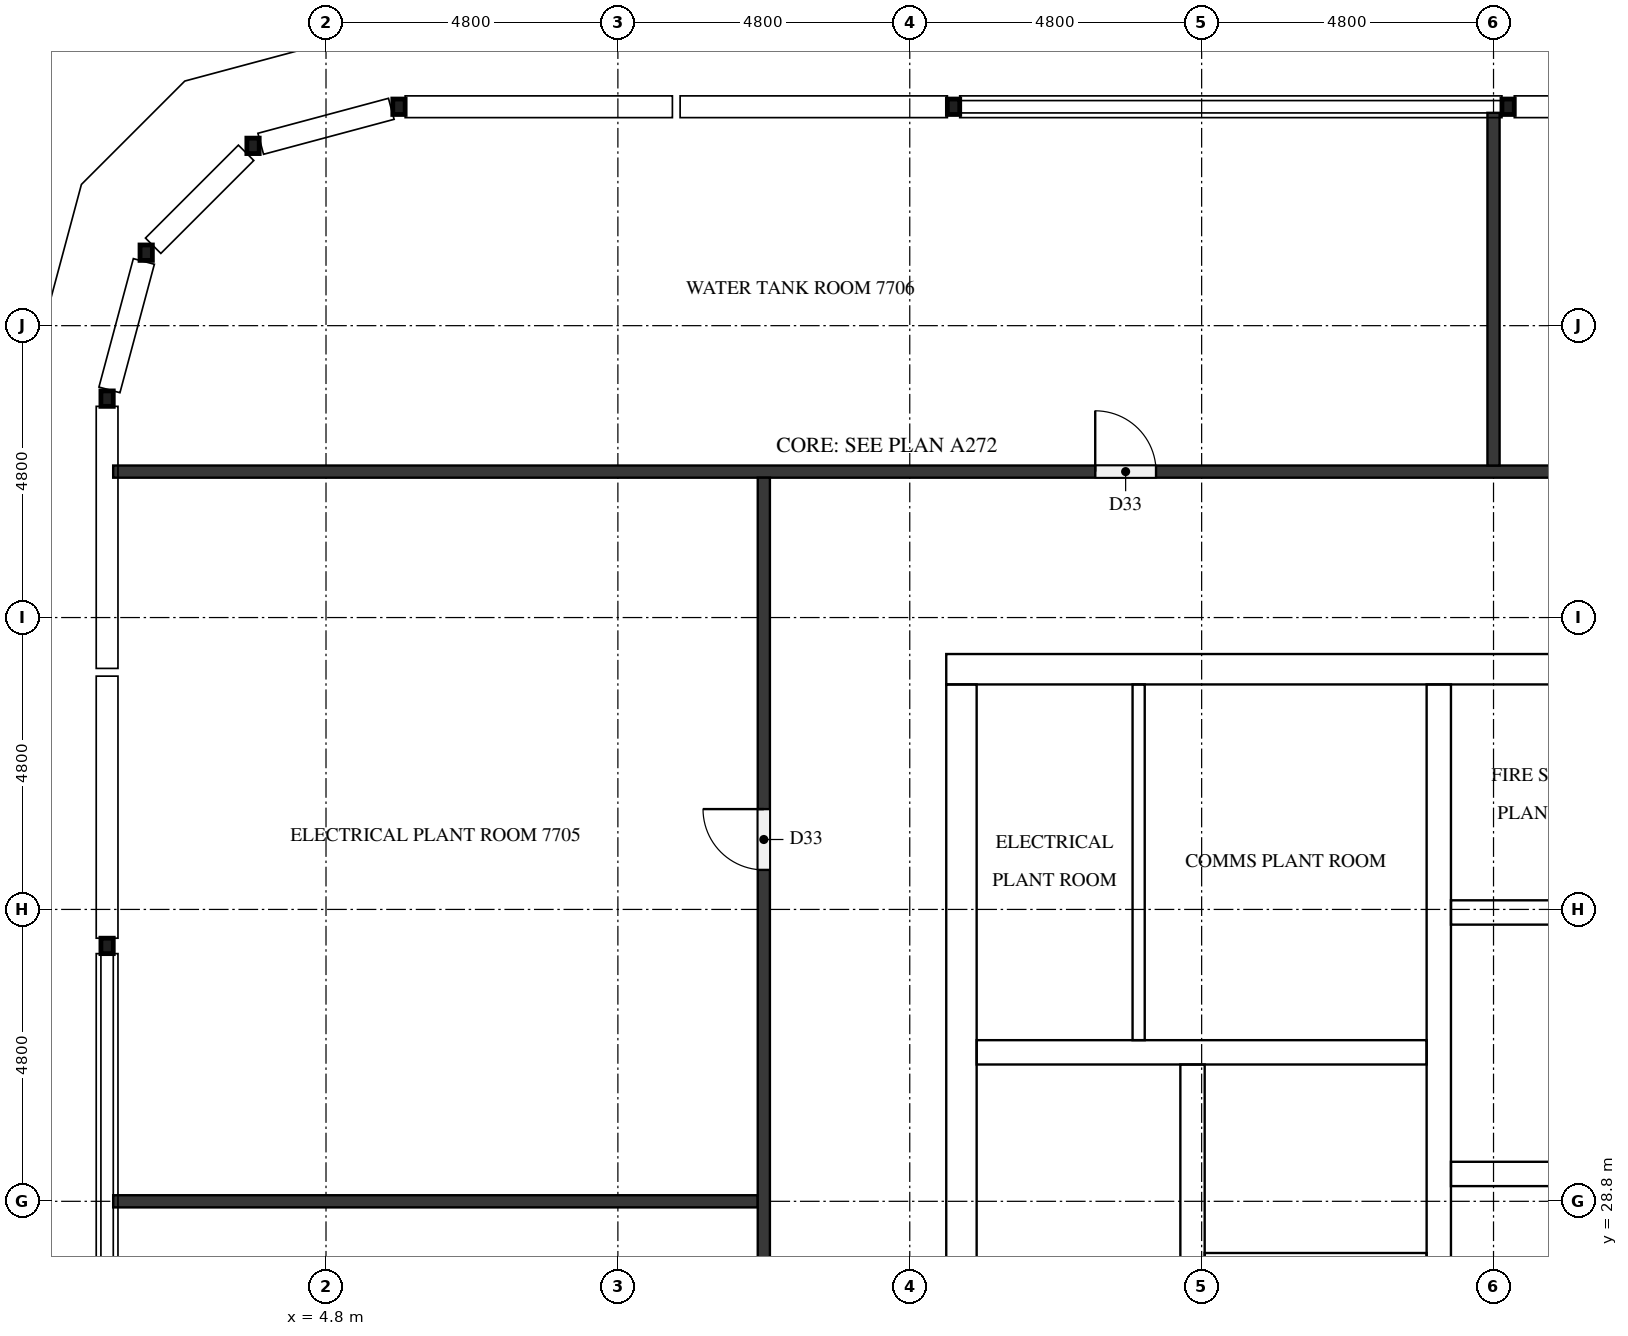
"""IFC4 building model, lengths in metres.
Left out: names, types, materials, properties, quantities, classifications, styles, units other than length and angle.
Written with IfcOpenShell. Run it as: python <this file> out.ifc"""

import sys

from ifc_helpers import new_model, si_unit, direction, frame, frame_2d, origin, origin_2d, place, context, subcontext, project, spatial, rectangle, hollow_rectangle, extrude, element, fill, save


model = new_model("IFC4")
c1 = context("Model", 3, precision=1e-05, world=origin(), true_north=direction((0.0, 1.0)))
c2 = subcontext(c1, "Body", "Model", "MODEL_VIEW")
j1 = project(units=[si_unit("LENGTHUNIT", "METRE"), si_unit("PLANEANGLEUNIT", "RADIAN")], contexts=[c1])
p1 = place(None, origin())
s1 = spatial("IfcSite", under=j1, at=p1, CompositionType="ELEMENT")
p2 = place(p1, origin())
s2 = spatial("IfcBuilding", under=s1, at=p2, CompositionType="ELEMENT")
p3 = place(p2, frame((0.0, 0.0, 296.3)))
s3 = spatial("IfcBuildingStorey", under=s2, at=p3, CompositionType="ELEMENT", Elevation=296.3)
p4 = place(p3, frame((15.0, 37.55, 0.0), z_axis=(0.0, 0.0, 1.0), x_axis=(1.0, 0.0, 0.0)))
e1 = element("IfcWall", 1, at=p4, inside=s3, PredefinedType="SHEAR", context=c2, shape_type="SweptSolid", body=[
    extrude(rectangle(XDim=32.4, YDim=0.5, at=frame_2d((16.2, 0.0))), origin(), (0.0, 0.0, 1.0), 4.4),
])
p5 = place(p4, frame((15.3, 0.0, 0.0)))
e2 = element("IfcOpeningElement", 2, at=p5, cuts=e1, PredefinedType="OPENING", context=c2, shape_type="SweptSolid", body=[
    extrude(rectangle(XDim=1.8, YDim=2.1, at=frame_2d((0.9, 1.05))), frame((0.0, 0.26, 0.0), z_axis=(0.0, -1.0, 0.0), x_axis=(1.0, 0.0, 0.0)), (0.0, 0.0, 1.0), 0.52),
])
p6 = place(p4, frame((1.282, 0.0, 0.0)))
e3 = element("IfcOpeningElement", 3, at=p6, cuts=e1, PredefinedType="OPENING", context=c2, shape_type="SweptSolid", body=[
    extrude(rectangle(XDim=1.0, YDim=2.1, at=frame_2d((0.5, 1.05))), frame((0.0, 0.26, 0.0), z_axis=(0.0, -1.0, 0.0), x_axis=(1.0, 0.0, 0.0)), (0.0, 0.0, 1.0), 0.52),
])
p7 = place(p4, frame((5.082, 0.0, 0.0)))
e4 = element("IfcOpeningElement", 4, at=p7, cuts=e1, PredefinedType="OPENING", context=c2, shape_type="SweptSolid", body=[
    extrude(rectangle(XDim=1.0, YDim=2.1, at=frame_2d((0.5, 1.05))), frame((0.0, 0.26, 0.0), z_axis=(0.0, -1.0, 0.0), x_axis=(1.0, 0.0, 0.0)), (0.0, 0.0, 1.0), 0.52),
])
p8 = place(p3, frame((15.25, 15.5, 0.0), z_axis=(0.0, 0.0, 1.0), x_axis=(0.0, 1.0, 0.0)))
e5 = element("IfcWall", 5, at=p8, inside=s3, PredefinedType="SHEAR", context=c2, shape_type="SweptSolid", body=[
    extrude(rectangle(XDim=21.8, YDim=0.5, at=frame_2d((10.9, 0.0))), origin(), (0.0, 0.0, 1.0), 4.4),
])
p9 = place(p8, frame((5.26, 0.0, 0.0)))
e6 = element("IfcOpeningElement", 6, at=p9, cuts=e5, PredefinedType="OPENING", context=c2, shape_type="SweptSolid", body=[
    extrude(rectangle(XDim=1.2, YDim=2.1, at=frame_2d((0.6, 1.05))), frame((0.0, 0.26, 0.0), z_axis=(0.0, -1.0, 0.0), x_axis=(1.0, 0.0, 0.0)), (0.0, 0.0, 1.0), 0.52),
])
p10 = place(p3, frame((19.05, 15.5, 0.0), z_axis=(0.0, 0.0, 1.0), x_axis=(0.0, 1.0, 0.0)))
e7 = element("IfcWall", 7, at=p10, inside=s3, PredefinedType="SHEAR", context=c2, shape_type="SweptSolid", body=[
    extrude(rectangle(XDim=15.55, YDim=0.4, at=frame_2d((7.775, 0.0))), origin(), (0.0, 0.0, 1.0), 4.4),
])
p11 = place(p10, frame((9.95, 0.0, 0.0)))
e8 = element("IfcOpeningElement", 8, at=p11, cuts=e7, PredefinedType="OPENING", context=c2, shape_type="SweptSolid", body=[
    extrude(rectangle(XDim=1.1, YDim=2.1, at=frame_2d((0.55, 1.05))), frame((0.0, 0.21, 0.0), z_axis=(0.0, -1.0, 0.0), x_axis=(1.0, 0.0, 0.0)), (0.0, 0.0, 1.0), 0.42),
])
p12 = place(p10, frame((13.45, 0.0, 0.0)))
e9 = element("IfcOpeningElement", 9, at=p12, cuts=e7, PredefinedType="OPENING", context=c2, shape_type="SweptSolid", body=[
    extrude(rectangle(XDim=1.1, YDim=2.1, at=frame_2d((0.55, 1.05))), frame((0.0, 0.21, 0.0), z_axis=(0.0, -1.0, 0.0), x_axis=(1.0, 0.0, 0.0)), (0.0, 0.0, 1.0), 0.42),
])
p13 = place(p10, frame((0.7, 0.0, 0.0)))
e10 = element("IfcOpeningElement", 10, at=p13, cuts=e7, PredefinedType="OPENING", context=c2, shape_type="SweptSolid", body=[
    extrude(rectangle(XDim=1.2, YDim=2.1, at=frame_2d((0.6, 1.05))), frame((0.0, 0.21, 0.0), z_axis=(0.0, -1.0, 0.0), x_axis=(1.0, 0.0, 0.0)), (0.0, 0.0, 1.0), 0.42),
])
p14 = place(p3, frame((23.1, 15.5, 0.0), z_axis=(0.0, 0.0, 1.0), x_axis=(0.0, 1.0, 0.0)))
e11 = element("IfcWall", 11, at=p14, inside=s3, PredefinedType="SHEAR", context=c2, shape_type="SweptSolid", body=[
    extrude(rectangle(XDim=21.8, YDim=0.4, at=frame_2d((10.9, 0.0))), origin(), (0.0, 0.0, 1.0), 4.4),
])
p15 = place(p3, frame((19.25, 27.75, 0.0), z_axis=(0.0, 0.0, 1.0), x_axis=(1.0, 0.0, 0.0)))
e12 = element("IfcWall", 12, at=p15, inside=s3, PredefinedType="SHEAR", context=c2, shape_type="SweptSolid", body=[
    extrude(rectangle(XDim=3.65, YDim=0.4, at=frame_2d((1.825, 0.0))), origin(), (0.0, 0.0, 1.0), 4.4),
])
p16 = place(p3, frame((15.5, 31.25, 0.0), z_axis=(0.0, 0.0, 1.0), x_axis=(1.0, 0.0, 0.0)))
e13 = element("IfcWall", 13, at=p16, inside=s3, PredefinedType="SHEAR", context=c2, shape_type="SweptSolid", body=[
    extrude(rectangle(XDim=7.4, YDim=0.4, at=frame_2d((3.7, 0.0))), origin(), (0.0, 0.0, 1.0), 4.4),
])
p17 = place(p3, frame((23.3, 29.25, 0.0), z_axis=(0.0, 0.0, 1.0), x_axis=(1.0, 0.0, 0.0)))
e14 = element("IfcWall", 14, at=p17, inside=s3, PredefinedType="SHEAR", context=c2, shape_type="SweptSolid", body=[
    extrude(rectangle(XDim=15.8, YDim=0.4, at=frame_2d((7.9, 0.0))), origin(), (0.0, 0.0, 1.0), 4.4),
])
p18 = place(p3, frame((23.3, 33.55, 0.0), z_axis=(0.0, 0.0, 1.0), x_axis=(1.0, 0.0, 0.0)))
e15 = element("IfcWall", 15, at=p18, inside=s3, PredefinedType="SHEAR", context=c2, shape_type="SweptSolid", body=[
    extrude(rectangle(XDim=5.6, YDim=0.4, at=frame_2d((2.8, 0.0))), origin(), (0.0, 0.0, 1.0), 4.4),
])
p19 = place(p18, frame((1.296, 0.0, 0.0)))
e16 = element("IfcOpeningElement", 16, at=p19, cuts=e15, PredefinedType="OPENING", context=c2, shape_type="SweptSolid", body=[
    extrude(rectangle(XDim=1.0, YDim=2.1, at=frame_2d((0.5, 1.05))), frame((0.0, 0.21, 0.0), z_axis=(0.0, -1.0, 0.0), x_axis=(1.0, 0.0, 0.0)), (0.0, 0.0, 1.0), 0.42),
])
p20 = place(p18, frame((3.996, 0.0, 0.0)))
e17 = element("IfcOpeningElement", 17, at=p20, cuts=e15, PredefinedType="OPENING", context=c2, shape_type="SweptSolid", body=[
    extrude(rectangle(XDim=1.0, YDim=2.1, at=frame_2d((0.5, 1.05))), frame((0.0, 0.21, 0.0), z_axis=(0.0, -1.0, 0.0), x_axis=(1.0, 0.0, 0.0)), (0.0, 0.0, 1.0), 0.42),
])
for number, where, z_axis, x_axis in (
    (18, (24.24, 46.8, 0.0), (0.0, 0.0, 1.0), (1.0, 0.0, 0.0)),
    (19, (15.12, 46.8, 0.0), (0.0, 0.0, 1.0), (1.0, 0.0, 0.0)),
    (20, (6.0, 46.8, 0.0), (0.0, 0.0, 1.0), (1.0, 0.0, 0.0)),
    (21, (3.6, 46.157, 0.0), (0.0, 0.0, 1.0), (1.0, 0.0, 0.0)),
    (22, (1.843, 44.4, 0.0), (0.0, 0.0, 1.0), (1.0, 0.0, 0.0)),
    (23, (1.2, 42.0, 0.0), (0.0, 0.0, 1.0), (1.0, 0.0, 0.0)),
    (24, (1.2, 33.0, 0.0), (0.0, 0.0, 1.0), (1.0, 0.0, 0.0)),
):
    element("IfcColumn", number, at=place(p3, frame(where, z_axis=z_axis, x_axis=x_axis)), inside=s3, PredefinedType="COLUMN", context=c2, shape_type="SweptSolid", body=[
        extrude(hollow_rectangle(XDim=0.203, YDim=0.254, WallThickness=0.01, InnerFilletRadius=0.004, OuterFilletRadius=0.013, at=origin_2d()), origin(), (0.0, 0.0, 1.0), 4.4),
    ])
p21 = place(p3, frame((18.164, 31.45, 0.0), z_axis=(0.0, 0.0, 1.0), x_axis=(0.0, 1.0, 0.0)))
e25 = element("IfcWall", 25, at=p21, inside=s3, PredefinedType="PARTITIONING", context=c2, shape_type="SweptSolid", body=[
    extrude(rectangle(XDim=5.85, YDim=0.2, at=frame_2d((2.925, 0.0))), origin(), (0.0, 0.0, 1.0), 4.4),
])
p22 = place(p3, frame((1.3, 28.8, 0.0), z_axis=(0.0, 0.0, 1.0), x_axis=(1.0, 0.0, 0.0)))
e26 = element("IfcWall", 26, at=p22, inside=s3, PredefinedType="PARTITIONING", context=c2, shape_type="SweptSolid", body=[
    extrude(rectangle(XDim=10.6, YDim=0.2, at=frame_2d((5.3, 0.0))), origin(), (0.0, 0.0, 1.0), 4.4),
])
p23 = place(p3, frame((1.3, 40.8, 0.0), z_axis=(0.0, 0.0, 1.0), x_axis=(1.0, 0.0, 0.0)))
e27 = element("IfcWall", 27, at=p23, inside=s3, PredefinedType="PARTITIONING", context=c2, shape_type="SweptSolid", body=[
    extrude(rectangle(XDim=55.0, YDim=0.2, at=frame_2d((27.5, 0.0))), origin(), (0.0, 0.0, 1.0), 4.4),
])
p24 = place(p23, frame((16.15, 0.0, 0.0)))
e28 = element("IfcOpeningElement", 28, at=p24, cuts=e27, PredefinedType="OPENING", context=c2, shape_type="SweptSolid", body=[
    extrude(rectangle(XDim=1.0, YDim=2.1, at=frame_2d((0.5, 1.05))), frame((0.0, 0.11, 0.0), z_axis=(0.0, -1.0, 0.0), x_axis=(1.0, 0.0, 0.0)), (0.0, 0.0, 1.0), 0.22),
])
p25 = place(p23, frame((35.35, 0.0, 0.0)))
e29 = element("IfcOpeningElement", 29, at=p25, cuts=e27, PredefinedType="OPENING", context=c2, shape_type="SweptSolid", body=[
    extrude(rectangle(XDim=1.0, YDim=2.1, at=frame_2d((0.5, 1.05))), frame((0.0, 0.11, 0.0), z_axis=(0.0, -1.0, 0.0), x_axis=(1.0, 0.0, 0.0)), (0.0, 0.0, 1.0), 0.22),
])
p26 = place(p3, frame((12.0, 12.1, 0.0), z_axis=(0.0, 0.0, 1.0), x_axis=(0.0, 1.0, 0.0)))
e30 = element("IfcWall", 30, at=p26, inside=s3, PredefinedType="PARTITIONING", context=c2, shape_type="SweptSolid", body=[
    extrude(rectangle(XDim=28.6, YDim=0.2, at=frame_2d((14.3, 0.0))), origin(), (0.0, 0.0, 1.0), 4.4),
])
p27 = place(p26, frame((7.85, 0.0, 0.0)))
e31 = element("IfcOpeningElement", 31, at=p27, cuts=e30, PredefinedType="OPENING", context=c2, shape_type="SweptSolid", body=[
    extrude(rectangle(XDim=1.0, YDim=2.1, at=frame_2d((0.5, 1.05))), frame((0.0, 0.11, 0.0), z_axis=(0.0, -1.0, 0.0), x_axis=(1.0, 0.0, 0.0)), (0.0, 0.0, 1.0), 0.22),
])
p28 = place(p26, frame((22.15, 0.0, 0.0)))
e32 = element("IfcOpeningElement", 32, at=p28, cuts=e30, PredefinedType="OPENING", context=c2, shape_type="SweptSolid", body=[
    extrude(rectangle(XDim=1.0, YDim=2.1, at=frame_2d((0.5, 1.05))), frame((0.0, 0.11, 0.0), z_axis=(0.0, -1.0, 0.0), x_axis=(1.0, 0.0, 0.0)), (0.0, 0.0, 1.0), 0.22),
])
p29 = place(p3, frame((24.0, 40.9, 0.0), z_axis=(0.0, 0.0, 1.0), x_axis=(0.0, 1.0, 0.0)))
e33 = element("IfcWall", 33, at=p29, inside=s3, PredefinedType="PARTITIONING", context=c2, shape_type="SweptSolid", body=[
    extrude(rectangle(XDim=5.8, YDim=0.2, at=frame_2d((2.9, 0.0))), origin(), (0.0, 0.0, 1.0), 4.4),
])
p30 = place(p12, origin())
e34 = element("IfcDoor", 34, at=p30, inside=s3, OperationType="DOUBLE_DOOR_SLIDING", PredefinedType="DOOR", context=c2, shape_type="SweptSolid", body=[
    extrude(rectangle(XDim=1.1, YDim=2.1, at=frame_2d((0.55, 1.05))), frame((0.0, 0.025, 0.0), z_axis=(0.0, -1.0, 0.0), x_axis=(1.0, 0.0, 0.0)), (0.0, 0.0, 1.0), 0.05),
])
fill(e9, e34)
p31 = place(p6, origin())
e35 = element("IfcDoor", 35, at=p31, inside=s3, OperationType="SINGLE_SWING_RIGHT", PredefinedType="DOOR", context=c2, shape_type="SweptSolid", body=[
    extrude(rectangle(XDim=1.0, YDim=2.1, at=frame_2d((0.5, 1.05))), frame((0.0, 0.025, 0.0), z_axis=(0.0, -1.0, 0.0), x_axis=(1.0, 0.0, 0.0)), (0.0, 0.0, 1.0), 0.05),
])
fill(e3, e35)
p32 = place(p7, origin())
e36 = element("IfcDoor", 36, at=p32, inside=s3, OperationType="SINGLE_SWING_LEFT", PredefinedType="DOOR", context=c2, shape_type="SweptSolid", body=[
    extrude(rectangle(XDim=1.0, YDim=2.1, at=frame_2d((0.5, 1.05))), frame((0.0, 0.025, 0.0), z_axis=(0.0, -1.0, 0.0), x_axis=(1.0, 0.0, 0.0)), (0.0, 0.0, 1.0), 0.05),
])
fill(e4, e36)
p33 = place(p19, frame((1.0, 0.0, 0.0), z_axis=(0.0, 0.0, 1.0), x_axis=(-1.0, 0.0, 0.0)))
e37 = element("IfcDoor", 37, at=p33, inside=s3, OperationType="SINGLE_SWING_LEFT", PredefinedType="DOOR", context=c2, shape_type="SweptSolid", body=[
    extrude(rectangle(XDim=1.0, YDim=2.1, at=frame_2d((0.5, 1.05))), frame((0.0, 0.025, 0.0), z_axis=(0.0, -1.0, 0.0), x_axis=(1.0, 0.0, 0.0)), (0.0, 0.0, 1.0), 0.05),
])
fill(e16, e37)
p34 = place(p28, origin())
e38 = element("IfcDoor", 38, at=p34, inside=s3, OperationType="SINGLE_SWING_RIGHT", PredefinedType="DOOR", context=c2, shape_type="SweptSolid", body=[
    extrude(rectangle(XDim=1.0, YDim=2.1, at=frame_2d((0.5, 1.05))), frame((0.0, 0.025, 0.0), z_axis=(0.0, -1.0, 0.0), x_axis=(1.0, 0.0, 0.0)), (0.0, 0.0, 1.0), 0.05),
])
fill(e32, e38)
p35 = place(p24, origin())
e39 = element("IfcDoor", 39, at=p35, inside=s3, OperationType="SINGLE_SWING_LEFT", PredefinedType="DOOR", context=c2, shape_type="SweptSolid", body=[
    extrude(rectangle(XDim=1.0, YDim=2.1, at=frame_2d((0.5, 1.05))), frame((0.0, 0.025, 0.0), z_axis=(0.0, -1.0, 0.0), x_axis=(1.0, 0.0, 0.0)), (0.0, 0.0, 1.0), 0.05),
])
fill(e28, e39)
save(model, sys.argv[1])
